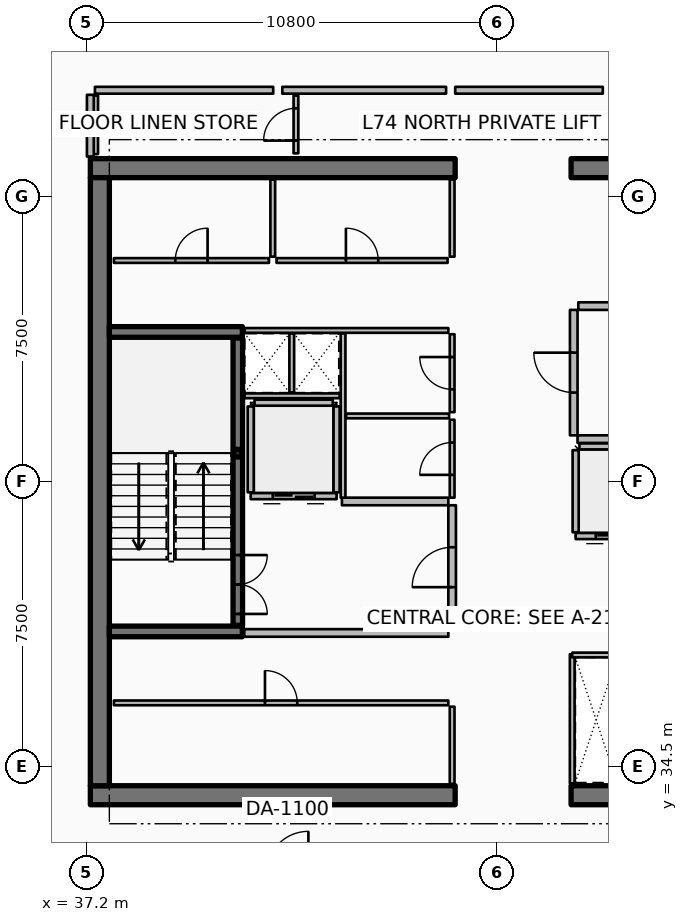
"""IFC4 building model, lengths in metres.
Left out: names, types, materials, properties, quantities, classifications, styles, units other than length and angle.
Written with IfcOpenShell. Run it as: python <this file> out.ifc"""

import sys

from ifc_helpers import new_model, si_unit, direction, frame, frame_2d, origin, origin_2d, place, context, subcontext, project, spatial, rectangle, hollow_rectangle, extrude, element, fill, save


model = new_model("IFC4")
c1 = context("Model", 3, precision=1e-05, world=origin(), true_north=direction((0.0, 1.0)))
c2 = subcontext(c1, "Body", "Model", "MODEL_VIEW")
j1 = project(units=[si_unit("LENGTHUNIT", "METRE"), si_unit("PLANEANGLEUNIT", "RADIAN")], contexts=[c1])
p1 = place(None, origin())
s1 = spatial("IfcSite", under=j1, at=p1, CompositionType="ELEMENT")
p2 = place(p1, origin())
s2 = spatial("IfcBuilding", under=s1, at=p2, CompositionType="ELEMENT")
p3 = place(p2, frame((0.0, 0.0, 294.45)))
s3 = spatial("IfcBuildingStorey", under=s2, at=p3, CompositionType="ELEMENT", Elevation=294.45)
p4 = place(p3, frame((37.3, 33.75, 0.0), z_axis=(0.0, 0.0, 1.0), x_axis=(1.0, 0.0, 0.0)))
e1 = element("IfcWall", 1, at=p4, inside=s3, PredefinedType="SHEAR", context=c2, shape_type="SweptSolid", body=[
    extrude(rectangle(XDim=9.6, YDim=0.5, at=frame_2d((4.8, 0.0))), origin(), (0.0, 0.0, 1.0), 3.85),
])
p5 = place(p3, frame((49.95, 33.75, 0.0), z_axis=(0.0, 0.0, 1.0), x_axis=(1.0, 0.0, 0.0)))
e2 = element("IfcWall", 2, at=p5, inside=s3, PredefinedType="SHEAR", context=c2, shape_type="SweptSolid", body=[
    extrude(rectangle(XDim=9.6, YDim=0.5, at=frame_2d((4.8, 0.0))), origin(), (0.0, 0.0, 1.0), 3.85),
])
p6 = place(p3, frame((37.3, 50.25, 0.0), z_axis=(0.0, 0.0, 1.0), x_axis=(1.0, 0.0, 0.0)))
e3 = element("IfcWall", 3, at=p6, inside=s3, PredefinedType="SHEAR", context=c2, shape_type="SweptSolid", body=[
    extrude(rectangle(XDim=9.6, YDim=0.5, at=frame_2d((4.8, 0.0))), origin(), (0.0, 0.0, 1.0), 3.85),
])
p7 = place(p3, frame((49.95, 50.25, 0.0), z_axis=(0.0, 0.0, 1.0), x_axis=(1.0, 0.0, 0.0)))
e4 = element("IfcWall", 4, at=p7, inside=s3, PredefinedType="SHEAR", context=c2, shape_type="SweptSolid", body=[
    extrude(rectangle(XDim=9.6, YDim=0.5, at=frame_2d((4.8, 0.0))), origin(), (0.0, 0.0, 1.0), 3.85),
])
p8 = place(p3, frame((37.55, 34.0, 0.0), z_axis=(0.0, 0.0, 1.0), x_axis=(0.0, 1.0, 0.0)))
e5 = element("IfcWall", 5, at=p8, inside=s3, PredefinedType="SHEAR", context=c2, shape_type="SweptSolid", body=[
    extrude(rectangle(XDim=16.0, YDim=0.5, at=frame_2d((8.0, 0.0))), origin(), (0.0, 0.0, 1.0), 3.85),
])
for number, where, z_axis, x_axis in (
    (6, (37.8, 38.06, 0.0), (0.0, 0.0, 1.0), (1.0, 0.0, 0.0)),
    (7, (37.8, 45.94, 0.0), (0.0, 0.0, 1.0), (1.0, 0.0, 0.0)),
):
    element("IfcWall", number, at=place(p3, frame(where, z_axis=z_axis, x_axis=x_axis)), inside=s3, PredefinedType="SHEAR", context=c2, shape_type="SweptSolid", body=[
        extrude(rectangle(XDim=3.5, YDim=0.28, at=frame_2d((1.75, 0.0))), origin(), (0.0, 0.0, 1.0), 3.85),
    ])
p9 = place(p3, frame((41.18, 42.75, 0.0), z_axis=(0.0, 0.0, 1.0), x_axis=(1.0, 0.0, 0.0)))
e8 = element("IfcColumn", 8, at=p9, inside=s3, PredefinedType="COLUMN", context=c2, shape_type="SweptSolid", body=[
    extrude(hollow_rectangle(XDim=0.2, YDim=0.2, WallThickness=0.01, InnerFilletRadius=0.01, OuterFilletRadius=0.02, at=origin_2d()), origin(), (0.0, 0.0, 1.0), 1.72),
])
p10 = place(p3, frame((41.18, 38.22, 0.0), z_axis=(0.0, 0.0, 1.0), x_axis=(0.0, 1.0, 0.0)))
e9 = element("IfcWall", 9, at=p10, inside=s3, PredefinedType="SOLIDWALL", context=c2, shape_type="SweptSolid", body=[
    extrude(rectangle(XDim=7.56, YDim=0.25, at=frame_2d((3.78, 0.0))), origin(), (0.0, 0.0, 1.0), 3.59),
])
p11 = place(p10, frame((0.3, 0.0, 0.0)))
e10 = element("IfcOpeningElement", 10, at=p11, cuts=e9, PredefinedType="OPENING", context=c2, shape_type="SweptSolid", body=[
    extrude(rectangle(XDim=1.55, YDim=2.15, at=frame_2d((0.775, 1.075))), frame((0.0, 0.135, 0.0), z_axis=(0.0, -1.0, 0.0), x_axis=(1.0, 0.0, 0.0)), (0.0, 0.0, 1.0), 0.27),
])
p12 = place(p3, frame((43.78, 41.62, 0.0), z_axis=(0.0, 0.0, 1.0), x_axis=(-1.0, 0.0, 0.0)))
e11 = element("IfcWall", 11, at=p12, inside=s3, PredefinedType="PARTITIONING", context=c2, shape_type="SweptSolid", body=[
    extrude(rectangle(XDim=2.26, YDim=0.16, at=frame_2d((1.13, 0.0))), origin(), (0.0, 0.0, 1.0), 3.59),
])
p13 = place(p12, frame((0.58, 0.0, 0.0)))
e12 = element("IfcOpeningElement", 12, at=p13, cuts=e11, PredefinedType="OPENING", context=c2, shape_type="SweptSolid", body=[
    extrude(rectangle(XDim=1.1, YDim=2.1, at=frame_2d((0.55, 1.05))), frame((0.0, 0.09, 0.0), z_axis=(0.0, -1.0, 0.0), x_axis=(1.0, 0.0, 0.0)), (0.0, 0.0, 1.0), 0.18),
])
for number, where, z_axis, x_axis in (
    (13, (43.78, 41.72, 0.0), (0.0, 0.0, 1.0), (0.0, 1.0, 0.0)),
    (14, (41.52, 41.72, 0.0), (0.0, 0.0, 1.0), (0.0, 1.0, 0.0)),
):
    element("IfcWall", number, at=place(p3, frame(where, z_axis=z_axis, x_axis=x_axis)), inside=s3, PredefinedType="PARTITIONING", context=c2, shape_type="SweptSolid", body=[
        extrude(rectangle(XDim=2.26, YDim=0.16, at=frame_2d((1.13, 0.0))), origin(), (0.0, 0.0, 1.0), 3.59),
    ])
p14 = place(p3, frame((41.62, 44.08, 0.0), z_axis=(0.0, 0.0, 1.0), x_axis=(1.0, 0.0, 0.0)))
e15 = element("IfcWall", 15, at=p14, inside=s3, PredefinedType="PARTITIONING", context=c2, shape_type="SweptSolid", body=[
    extrude(rectangle(XDim=2.06, YDim=0.16, at=frame_2d((1.03, 0.0))), origin(), (0.0, 0.0, 1.0), 3.59),
])
p15 = place(p3, frame((52.23, 40.57, 0.0), z_axis=(0.0, 0.0, 1.0), x_axis=(-1.0, 0.0, 0.0)))
e16 = element("IfcWall", 16, at=p15, inside=s3, PredefinedType="PARTITIONING", context=c2, shape_type="SweptSolid", body=[
    extrude(rectangle(XDim=2.16, YDim=0.16, at=frame_2d((1.08, 0.0))), origin(), (0.0, 0.0, 1.0), 3.59),
])
p16 = place(p15, frame((0.53, 0.0, 0.0)))
e17 = element("IfcOpeningElement", 17, at=p16, cuts=e16, PredefinedType="OPENING", context=c2, shape_type="SweptSolid", body=[
    extrude(rectangle(XDim=1.1, YDim=2.1, at=frame_2d((0.55, 1.05))), frame((0.0, 0.09, 0.0), z_axis=(0.0, -1.0, 0.0), x_axis=(1.0, 0.0, 0.0)), (0.0, 0.0, 1.0), 0.18),
])
p17 = place(p3, frame((50.07, 40.67, 0.0), z_axis=(0.0, 0.0, 1.0), x_axis=(0.0, 1.0, 0.0)))
e18 = element("IfcWall", 18, at=p17, inside=s3, PredefinedType="PARTITIONING", context=c2, shape_type="SweptSolid", body=[
    extrude(rectangle(XDim=2.16, YDim=0.16, at=frame_2d((1.08, 0.0))), origin(), (0.0, 0.0, 1.0), 3.59),
])
p18 = place(p3, frame((50.17, 42.93, 0.0), z_axis=(0.0, 0.0, 1.0), x_axis=(1.0, 0.0, 0.0)))
e19 = element("IfcWall", 19, at=p18, inside=s3, PredefinedType="PARTITIONING", context=c2, shape_type="SweptSolid", body=[
    extrude(rectangle(XDim=1.96, YDim=0.16, at=frame_2d((0.98, 0.0))), origin(), (0.0, 0.0, 1.0), 3.59),
])
p19 = place(p3, frame((46.82, 34.05, 0.0), z_axis=(0.0, 0.0, 1.0), x_axis=(0.0, 1.0, 0.0)))
e20 = element("IfcWall", 20, at=p19, inside=s3, PredefinedType="PARTITIONING", context=c2, shape_type="SweptSolid", body=[
    extrude(rectangle(XDim=2.03, YDim=0.125, at=frame_2d((1.015, 0.0))), origin(), (0.0, 0.0, 1.0), 3.03),
])
p20 = place(p3, frame((37.92, 36.18, 0.0), z_axis=(0.0, 0.0, 1.0), x_axis=(1.0, 0.0, 0.0)))
e21 = element("IfcWall", 21, at=p20, inside=s3, PredefinedType="PARTITIONING", context=c2, shape_type="SweptSolid", body=[
    extrude(rectangle(XDim=8.8, YDim=0.125, at=frame_2d((4.4, 0.0))), origin(), (0.0, 0.0, 1.0), 3.03),
])
p21 = place(p20, frame((3.975, 0.0, 0.0)))
e22 = element("IfcOpeningElement", 22, at=p21, cuts=e21, PredefinedType="OPENING", context=c2, shape_type="SweptSolid", body=[
    extrude(rectangle(XDim=0.85, YDim=2.06, at=frame_2d((0.425, 1.03))), frame((0.0, 0.073, 0.0), z_axis=(0.0, -1.0, 0.0), x_axis=(1.0, 0.0, 0.0)), (0.0, 0.0, 1.0), 0.145),
])
for number, where, z_axis, x_axis in (
    (23, (46.82, 47.92, 0.0), (0.0, 0.0, 1.0), (0.0, 1.0, 0.0)),
    (24, (42.1, 47.92, 0.0), (0.0, 0.0, 1.0), (0.0, 1.0, 0.0)),
):
    element("IfcWall", number, at=place(p3, frame(where, z_axis=z_axis, x_axis=x_axis)), inside=s3, PredefinedType="PARTITIONING", context=c2, shape_type="SweptSolid", body=[
        extrude(rectangle(XDim=2.03, YDim=0.125, at=frame_2d((1.015, 0.0))), origin(), (0.0, 0.0, 1.0), 3.03),
    ])
p22 = place(p3, frame((37.92, 47.82, 0.0), z_axis=(0.0, 0.0, 1.0), x_axis=(1.0, 0.0, 0.0)))
e25 = element("IfcWall", 25, at=p22, inside=s3, PredefinedType="PARTITIONING", context=c2, shape_type="SweptSolid", body=[
    extrude(rectangle(XDim=4.08, YDim=0.125, at=frame_2d((2.04, 0.0))), origin(), (0.0, 0.0, 1.0), 3.03),
])
p23 = place(p22, frame((1.615, 0.0, 0.0)))
e26 = element("IfcOpeningElement", 26, at=p23, cuts=e25, PredefinedType="OPENING", context=c2, shape_type="SweptSolid", body=[
    extrude(rectangle(XDim=0.85, YDim=2.06, at=frame_2d((0.425, 1.03))), frame((0.0, 0.073, 0.0), z_axis=(0.0, -1.0, 0.0), x_axis=(1.0, 0.0, 0.0)), (0.0, 0.0, 1.0), 0.145),
])
p24 = place(p3, frame((42.2, 47.82, 0.0), z_axis=(0.0, 0.0, 1.0), x_axis=(1.0, 0.0, 0.0)))
e27 = element("IfcWall", 27, at=p24, inside=s3, PredefinedType="PARTITIONING", context=c2, shape_type="SweptSolid", body=[
    extrude(rectangle(XDim=4.5, YDim=0.125, at=frame_2d((2.25, 0.0))), origin(), (0.0, 0.0, 1.0), 3.03),
])
p25 = place(p24, frame((1.825, 0.0, 0.0)))
e28 = element("IfcOpeningElement", 28, at=p25, cuts=e27, PredefinedType="OPENING", context=c2, shape_type="SweptSolid", body=[
    extrude(rectangle(XDim=0.85, YDim=2.06, at=frame_2d((0.425, 1.03))), frame((0.0, 0.073, 0.0), z_axis=(0.0, -1.0, 0.0), x_axis=(1.0, 0.0, 0.0)), (0.0, 0.0, 1.0), 0.145),
])
p26 = place(p3, frame((41.35, 38.02, 0.0), z_axis=(0.0, 0.0, 1.0), x_axis=(1.0, 0.0, 0.0)))
e29 = element("IfcWall", 29, at=p26, inside=s3, PredefinedType="PARTITIONING", context=c2, shape_type="SweptSolid", body=[
    extrude(rectangle(XDim=5.37, YDim=0.2, at=frame_2d((2.685, 0.0))), origin(), (0.0, 0.0, 1.0), 3.59),
])
p27 = place(p3, frame((43.92, 41.48, 0.0), z_axis=(0.0, 0.0, 1.0), x_axis=(1.0, 0.0, 0.0)))
e30 = element("IfcWall", 30, at=p27, inside=s3, PredefinedType="PARTITIONING", context=c2, shape_type="SweptSolid", body=[
    extrude(rectangle(XDim=2.8, YDim=0.2, at=frame_2d((1.4, 0.0))), origin(), (0.0, 0.0, 1.0), 3.59),
])
p28 = place(p3, frame((46.82, 38.12, 0.0), z_axis=(0.0, 0.0, 1.0), x_axis=(0.0, 1.0, 0.0)))
e31 = element("IfcWall", 31, at=p28, inside=s3, PredefinedType="PARTITIONING", context=c2, shape_type="SweptSolid", body=[
    extrude(rectangle(XDim=3.26, YDim=0.2, at=frame_2d((1.63, 0.0))), origin(), (0.0, 0.0, 1.0), 3.59),
])
p29 = place(p28, frame((1.105, 0.0, 0.0)))
e32 = element("IfcOpeningElement", 32, at=p29, cuts=e31, PredefinedType="OPENING", context=c2, shape_type="SweptSolid", body=[
    extrude(rectangle(XDim=1.05, YDim=2.1, at=frame_2d((0.525, 1.05))), frame((0.0, 0.11, 0.0), z_axis=(0.0, -1.0, 0.0), x_axis=(1.0, 0.0, 0.0)), (0.0, 0.0, 1.0), 0.22),
])
p30 = place(p3, frame((50.12, 43.12, 0.0), z_axis=(0.0, 0.0, 1.0), x_axis=(1.0, 0.0, 0.0)))
e33 = element("IfcWall", 33, at=p30, inside=s3, PredefinedType="PARTITIONING", context=c2, shape_type="SweptSolid", body=[
    extrude(rectangle(XDim=8.88, YDim=0.2, at=frame_2d((4.44, 0.0))), origin(), (0.0, 0.0, 1.0), 3.59),
])
p31 = place(p3, frame((50.14, 46.62, 0.0), z_axis=(0.0, 0.0, 1.0), x_axis=(1.0, 0.0, 0.0)))
e34 = element("IfcWall", 34, at=p31, inside=s3, PredefinedType="PARTITIONING", context=c2, shape_type="SweptSolid", body=[
    extrude(rectangle(XDim=1.02, YDim=0.2, at=frame_2d((0.51, 0.0))), origin(), (0.0, 0.0, 1.0), 3.59),
])
p32 = place(p3, frame((50.02, 43.22, 0.0), z_axis=(0.0, 0.0, 1.0), x_axis=(0.0, 1.0, 0.0)))
e35 = element("IfcWall", 35, at=p32, inside=s3, PredefinedType="PARTITIONING", context=c2, shape_type="SweptSolid", body=[
    extrude(rectangle(XDim=3.3, YDim=0.2, at=frame_2d((1.65, 0.0))), origin(), (0.0, 0.0, 1.0), 3.59),
])
p33 = place(p32, frame((1.125, 0.0, 0.0)))
e36 = element("IfcOpeningElement", 36, at=p33, cuts=e35, PredefinedType="OPENING", context=c2, shape_type="SweptSolid", body=[
    extrude(rectangle(XDim=1.05, YDim=2.1, at=frame_2d((0.525, 1.05))), frame((0.0, 0.11, 0.0), z_axis=(0.0, -1.0, 0.0), x_axis=(1.0, 0.0, 0.0)), (0.0, 0.0, 1.0), 0.22),
])
p34 = place(p3, frame((41.36, 45.98, 0.0), z_axis=(0.0, 0.0, 1.0), x_axis=(1.0, 0.0, 0.0)))
e37 = element("IfcWall", 37, at=p34, inside=s3, PredefinedType="PARTITIONING", context=c2, shape_type="SweptSolid", body=[
    extrude(rectangle(XDim=5.36, YDim=0.125, at=frame_2d((2.68, 0.0))), origin(), (0.0, 0.0, 1.0), 3.03),
])
p35 = place(p3, frame((41.36, 44.26, 0.0), z_axis=(0.0, 0.0, 1.0), x_axis=(1.0, 0.0, 0.0)))
e38 = element("IfcWall", 38, at=p35, inside=s3, PredefinedType="PARTITIONING", context=c2, shape_type="SweptSolid", body=[
    extrude(rectangle(XDim=2.5, YDim=0.125, at=frame_2d((1.25, 0.0))), origin(), (0.0, 0.0, 1.0), 3.03),
])
p36 = place(p3, frame((42.6, 44.35, 0.0), z_axis=(0.0, 0.0, 1.0), x_axis=(0.0, 1.0, 0.0)))
e39 = element("IfcWall", 39, at=p36, inside=s3, PredefinedType="PARTITIONING", context=c2, shape_type="SweptSolid", body=[
    extrude(rectangle(XDim=1.55, YDim=0.125, at=frame_2d((0.775, 0.0))), origin(), (0.0, 0.0, 1.0), 3.03),
])
p37 = place(p3, frame((49.98, 34.06, 0.0), z_axis=(0.0, 0.0, 1.0), x_axis=(0.0, 1.0, 0.0)))
e40 = element("IfcWall", 40, at=p37, inside=s3, PredefinedType="PARTITIONING", context=c2, shape_type="SweptSolid", body=[
    extrude(rectangle(XDim=3.4, YDim=0.125, at=frame_2d((1.7, 0.0))), origin(), (0.0, 0.0, 1.0), 3.03),
])
p38 = place(p3, frame((49.98, 37.44, 0.0), z_axis=(0.0, 0.0, 1.0), x_axis=(1.0, 0.0, 0.0)))
e41 = element("IfcWall", 41, at=p38, inside=s3, PredefinedType="PARTITIONING", context=c2, shape_type="SweptSolid", body=[
    extrude(rectangle(XDim=1.26, YDim=0.125, at=frame_2d((0.63, 0.0))), origin(), (0.0, 0.0, 1.0), 3.03),
])
p39 = place(p3, frame((43.95, 41.58, 0.0), z_axis=(0.0, 0.0, 1.0), x_axis=(0.0, 1.0, 0.0)))
e42 = element("IfcWall", 42, at=p39, inside=s3, PredefinedType="PARTITIONING", context=c2, shape_type="SweptSolid", body=[
    extrude(rectangle(XDim=4.32, YDim=0.125, at=frame_2d((2.16, 0.0))), origin(), (0.0, 0.0, 1.0), 3.03),
])
p40 = place(p3, frame((44.03, 43.73, 0.0), z_axis=(0.0, 0.0, 1.0), x_axis=(1.0, 0.0, 0.0)))
e43 = element("IfcWall", 43, at=p40, inside=s3, PredefinedType="PARTITIONING", context=c2, shape_type="SweptSolid", body=[
    extrude(rectangle(XDim=2.71, YDim=0.125, at=frame_2d((1.355, 0.0))), origin(), (0.0, 0.0, 1.0), 3.03),
])
p41 = place(p3, frame((46.82, 41.58, 0.0), z_axis=(0.0, 0.0, 1.0), x_axis=(0.0, 1.0, 0.0)))
e44 = element("IfcWall", 44, at=p41, inside=s3, PredefinedType="PARTITIONING", context=c2, shape_type="SweptSolid", body=[
    extrude(rectangle(XDim=2.05, YDim=0.125, at=frame_2d((1.025, 0.0))), origin(), (0.0, 0.0, 1.0), 3.03),
])
p42 = place(p41, frame((0.6, 0.0, 0.0)))
e45 = element("IfcOpeningElement", 45, at=p42, cuts=e44, PredefinedType="OPENING", context=c2, shape_type="SweptSolid", body=[
    extrude(rectangle(XDim=0.85, YDim=2.06, at=frame_2d((0.425, 1.03))), frame((0.0, 0.073, 0.0), z_axis=(0.0, -1.0, 0.0), x_axis=(1.0, 0.0, 0.0)), (0.0, 0.0, 1.0), 0.145),
])
p43 = place(p3, frame((46.82, 43.83, 0.0), z_axis=(0.0, 0.0, 1.0), x_axis=(0.0, 1.0, 0.0)))
e46 = element("IfcWall", 46, at=p43, inside=s3, PredefinedType="PARTITIONING", context=c2, shape_type="SweptSolid", body=[
    extrude(rectangle(XDim=2.05, YDim=0.125, at=frame_2d((1.025, 0.0))), origin(), (0.0, 0.0, 1.0), 3.03),
])
p44 = place(p43, frame((0.6, 0.0, 0.0)))
e47 = element("IfcOpeningElement", 47, at=p44, cuts=e46, PredefinedType="OPENING", context=c2, shape_type="SweptSolid", body=[
    extrude(rectangle(XDim=0.85, YDim=2.06, at=frame_2d((0.425, 1.03))), frame((0.0, 0.073, 0.0), z_axis=(0.0, -1.0, 0.0), x_axis=(1.0, 0.0, 0.0)), (0.0, 0.0, 1.0), 0.145),
])
p45 = place(p3, frame((37.44, 50.62, 0.0), z_axis=(0.0, 0.0, 1.0), x_axis=(0.0, 1.0, 0.0)))
e48 = element("IfcWall", 48, at=p45, inside=s3, PredefinedType="PARTITIONING", context=c2, shape_type="SweptSolid", body=[
    extrude(rectangle(XDim=1.54, YDim=0.125, at=frame_2d((0.77, 0.0))), origin(), (0.0, 0.0, 1.0), 3.03),
])
p46 = place(p3, frame((42.71, 50.64, 0.0), z_axis=(0.0, 0.0, 1.0), x_axis=(0.0, 1.0, 0.0)))
e49 = element("IfcWall", 49, at=p46, inside=s3, PredefinedType="PARTITIONING", context=c2, shape_type="SweptSolid", body=[
    extrude(rectangle(XDim=1.52, YDim=0.125, at=frame_2d((0.76, 0.0))), origin(), (0.0, 0.0, 1.0), 2.957),
])
p47 = place(p46, frame((0.335, 0.0, 0.0)))
e50 = element("IfcOpeningElement", 50, at=p47, cuts=e49, PredefinedType="OPENING", context=c2, shape_type="SweptSolid", body=[
    extrude(rectangle(XDim=0.85, YDim=2.06, at=frame_2d((0.425, 1.03))), frame((0.0, 0.073, 0.0), z_axis=(0.0, -1.0, 0.0), x_axis=(1.0, 0.0, 0.0)), (0.0, 0.0, 1.0), 0.145),
])
p48 = place(p3, frame((50.785, 52.3, 0.0), z_axis=(0.0, 0.0, 1.0), x_axis=(-1.0, 0.0, 0.0)))
e51 = element("IfcWall", 51, at=p48, inside=s3, PredefinedType="PARTITIONING", context=c2, shape_type="SweptSolid", body=[
    extrude(rectangle(XDim=3.884, YDim=0.18, at=frame_2d((1.942, 0.0))), origin(), (0.0, 0.0, 1.0), 2.957),
])
p49 = place(p3, frame((46.661, 52.3, 0.0), z_axis=(0.0, 0.0, 1.0), x_axis=(-1.0, 0.0, 0.0)))
e52 = element("IfcWall", 52, at=p49, inside=s3, PredefinedType="PARTITIONING", context=c2, shape_type="SweptSolid", body=[
    extrude(rectangle(XDim=4.309, YDim=0.18, at=frame_2d((2.155, 0.0))), origin(), (0.0, 0.0, 1.0), 2.957),
])
p50 = place(p3, frame((42.112, 52.3, 0.0), z_axis=(0.0, 0.0, 1.0), x_axis=(-1.0, 0.0, 0.0)))
e53 = element("IfcWall", 53, at=p50, inside=s3, PredefinedType="PARTITIONING", context=c2, shape_type="SweptSolid", body=[
    extrude(rectangle(XDim=4.692, YDim=0.18, at=frame_2d((2.346, 0.0))), origin(), (0.0, 0.0, 1.0), 2.957),
])
p51 = place(p3, frame((37.3, 52.18, 0.0), z_axis=(0.0, 0.0, 1.0), x_axis=(0.0, -1.0, 0.0)))
e54 = element("IfcWall", 54, at=p51, inside=s3, PredefinedType="PARTITIONING", context=c2, shape_type="SweptSolid", body=[
    extrude(rectangle(XDim=1.625, YDim=0.18, at=frame_2d((0.812, 0.0))), origin(), (0.0, 0.0, 1.0), 2.957),
])
p52 = place(p11, origin())
e55 = element("IfcDoor", 55, at=p52, inside=s3, OperationType="DOUBLE_DOOR_SINGLE_SWING", PredefinedType="DOOR", context=c2, shape_type="SweptSolid", body=[
    extrude(rectangle(XDim=1.55, YDim=2.15, at=frame_2d((0.775, 1.075))), frame((0.0, 0.025, 0.0), z_axis=(0.0, -1.0, 0.0), x_axis=(1.0, 0.0, 0.0)), (0.0, 0.0, 1.0), 0.05),
])
fill(e10, e55)
p53 = place(p13, origin())
e56 = element("IfcDoor", 56, at=p53, inside=s3, OperationType="DOUBLE_DOOR_SLIDING", PredefinedType="DOOR", context=c2, shape_type="SweptSolid", body=[
    extrude(rectangle(XDim=1.1, YDim=2.1, at=frame_2d((0.55, 1.05))), frame((0.0, 0.025, 0.0), z_axis=(0.0, -1.0, 0.0), x_axis=(1.0, 0.0, 0.0)), (0.0, 0.0, 1.0), 0.05),
])
fill(e12, e56)
p54 = place(p16, origin())
e57 = element("IfcDoor", 57, at=p54, inside=s3, OperationType="DOUBLE_DOOR_SLIDING", PredefinedType="DOOR", context=c2, shape_type="SweptSolid", body=[
    extrude(rectangle(XDim=1.1, YDim=2.1, at=frame_2d((0.55, 1.05))), frame((0.0, 0.025, 0.0), z_axis=(0.0, -1.0, 0.0), x_axis=(1.0, 0.0, 0.0)), (0.0, 0.0, 1.0), 0.05),
])
fill(e17, e57)
p55 = place(p21, origin())
e58 = element("IfcDoor", 58, at=p55, inside=s3, OperationType="SINGLE_SWING_LEFT", PredefinedType="DOOR", context=c2, shape_type="SweptSolid", body=[
    extrude(rectangle(XDim=0.85, YDim=2.06, at=frame_2d((0.425, 1.03))), frame((0.0, 0.025, 0.0), z_axis=(0.0, -1.0, 0.0), x_axis=(1.0, 0.0, 0.0)), (0.0, 0.0, 1.0), 0.05),
])
fill(e22, e58)
p56 = place(p23, origin())
e59 = element("IfcDoor", 59, at=p56, inside=s3, OperationType="SINGLE_SWING_RIGHT", PredefinedType="DOOR", context=c2, shape_type="SweptSolid", body=[
    extrude(rectangle(XDim=0.85, YDim=2.06, at=frame_2d((0.425, 1.03))), frame((0.0, 0.025, 0.0), z_axis=(0.0, -1.0, 0.0), x_axis=(1.0, 0.0, 0.0)), (0.0, 0.0, 1.0), 0.05),
])
fill(e26, e59)
p57 = place(p25, origin())
e60 = element("IfcDoor", 60, at=p57, inside=s3, OperationType="SINGLE_SWING_LEFT", PredefinedType="DOOR", context=c2, shape_type="SweptSolid", body=[
    extrude(rectangle(XDim=0.85, YDim=2.06, at=frame_2d((0.425, 1.03))), frame((0.0, 0.025, 0.0), z_axis=(0.0, -1.0, 0.0), x_axis=(1.0, 0.0, 0.0)), (0.0, 0.0, 1.0), 0.05),
])
fill(e28, e60)
p58 = place(p29, origin())
e61 = element("IfcDoor", 61, at=p58, inside=s3, OperationType="SINGLE_SWING_LEFT", PredefinedType="DOOR", context=c2, shape_type="SweptSolid", body=[
    extrude(rectangle(XDim=1.05, YDim=2.1, at=frame_2d((0.525, 1.05))), frame((0.0, 0.025, 0.0), z_axis=(0.0, -1.0, 0.0), x_axis=(1.0, 0.0, 0.0)), (0.0, 0.0, 1.0), 0.05),
])
fill(e32, e61)
p59 = place(p33, origin())
e62 = element("IfcDoor", 62, at=p59, inside=s3, OperationType="SINGLE_SWING_RIGHT", PredefinedType="DOOR", context=c2, shape_type="SweptSolid", body=[
    extrude(rectangle(XDim=1.05, YDim=2.1, at=frame_2d((0.525, 1.05))), frame((0.0, 0.025, 0.0), z_axis=(0.0, -1.0, 0.0), x_axis=(1.0, 0.0, 0.0)), (0.0, 0.0, 1.0), 0.05),
])
fill(e36, e62)
p60 = place(p42, origin())
e63 = element("IfcDoor", 63, at=p60, inside=s3, OperationType="SINGLE_SWING_LEFT", PredefinedType="DOOR", context=c2, shape_type="SweptSolid", body=[
    extrude(rectangle(XDim=0.85, YDim=2.06, at=frame_2d((0.425, 1.03))), frame((0.0, 0.025, 0.0), z_axis=(0.0, -1.0, 0.0), x_axis=(1.0, 0.0, 0.0)), (0.0, 0.0, 1.0), 0.05),
])
fill(e45, e63)
p61 = place(p44, origin())
e64 = element("IfcDoor", 64, at=p61, inside=s3, OperationType="SINGLE_SWING_RIGHT", PredefinedType="DOOR", context=c2, shape_type="SweptSolid", body=[
    extrude(rectangle(XDim=0.85, YDim=2.06, at=frame_2d((0.425, 1.03))), frame((0.0, 0.025, 0.0), z_axis=(0.0, -1.0, 0.0), x_axis=(1.0, 0.0, 0.0)), (0.0, 0.0, 1.0), 0.05),
])
fill(e47, e64)
p62 = place(p47, origin())
e65 = element("IfcDoor", 65, at=p62, inside=s3, OperationType="SINGLE_SWING_LEFT", PredefinedType="DOOR", context=c2, shape_type="SweptSolid", body=[
    extrude(rectangle(XDim=0.85, YDim=2.06, at=frame_2d((0.425, 1.03))), frame((0.0, 0.025, 0.0), z_axis=(0.0, -1.0, 0.0), x_axis=(1.0, 0.0, 0.0)), (0.0, 0.0, 1.0), 0.05),
])
fill(e50, e65)
save(model, sys.argv[1])
